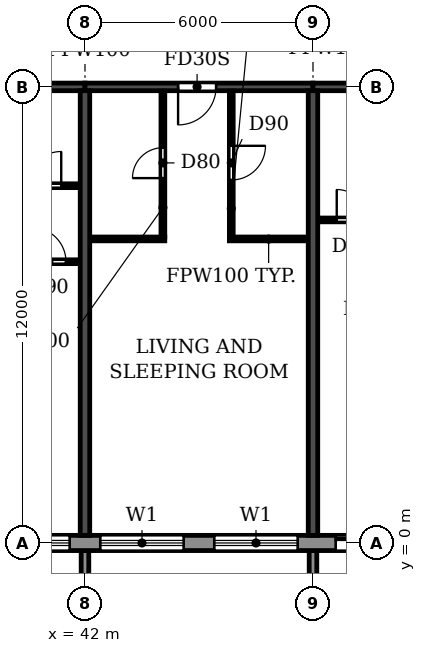
"""IFC4 building model, lengths in metres.
Left out: names, types, materials, properties, quantities, classifications, styles, units other than length and angle.
Written with IfcOpenShell. Run it as: python <this file> out.ifc"""

import sys

from ifc_helpers import new_model, si_unit, direction, frame, frame_2d, origin, place, context, subcontext, project, spatial, polyline, rectangle, outline, extrude, source, transform, mapped, element, fill, save


model = new_model("IFC4")
c1 = context("Model", 3, precision=1e-05, world=origin(), true_north=direction((0.0, 1.0)))
c2 = subcontext(c1, "Body", "Model", "MODEL_VIEW")
j1 = project(units=[si_unit("LENGTHUNIT", "METRE"), si_unit("PLANEANGLEUNIT", "RADIAN")], contexts=[c1])
p1 = place(None, origin())
s1 = spatial("IfcSite", under=j1, at=p1, CompositionType="ELEMENT")
p2 = place(p1, origin())
s2 = spatial("IfcBuilding", under=s1, at=p2, CompositionType="ELEMENT")
p3 = place(p2, frame((0.0, 0.0, 208.2)))
s3 = spatial("IfcBuildingStorey", under=s2, at=p3, CompositionType="ELEMENT", Elevation=208.2)
for number, where, z_axis, x_axis in (
    (1, (42.0, 0.2, 0.0), (0.0, 0.0, 1.0), (0.0, 1.0, 0.0)),
    (2, (48.0, 0.2, 0.0), (0.0, 0.0, 1.0), (0.0, 1.0, 0.0)),
):
    element("IfcWall", number, at=place(p3, frame(where, z_axis=z_axis, x_axis=x_axis)), inside=s3, PredefinedType="SHEAR", context=c2, shape_type="SweptSolid", body=[
        extrude(rectangle(XDim=11.7, YDim=0.25, at=frame_2d((5.85, 0.0))), origin(), (0.0, 0.0, 1.0), 3.0),
    ])
p4 = place(p3, frame((36.0, 12.0, 0.0), z_axis=(0.0, 0.0, 1.0), x_axis=(1.0, 0.0, 0.0)))
e3 = element("IfcWall", 3, at=p4, inside=s3, PredefinedType="SHEAR", context=c2, shape_type="SweptSolid", body=[
    extrude(rectangle(XDim=6.0, YDim=0.2, at=frame_2d((3.0, 0.0))), origin(), (0.0, 0.0, 1.0), 2.4),
])
p5 = place(p4, frame((2.45, 0.0, 0.0)))
e4 = element("IfcOpeningElement", 4, at=p5, cuts=e3, PredefinedType="OPENING", context=c2, shape_type="SweptSolid", body=[
    extrude(rectangle(XDim=1.0, YDim=2.1, at=frame_2d((0.5, 1.05))), frame((0.0, 0.11, 0.0), z_axis=(0.0, -1.0, 0.0), x_axis=(1.0, 0.0, 0.0)), (0.0, 0.0, 1.0), 0.22),
])
p6 = place(p3, frame((42.0, 12.0, 0.0), z_axis=(0.0, 0.0, 1.0), x_axis=(1.0, 0.0, 0.0)))
e5 = element("IfcWall", 5, at=p6, inside=s3, PredefinedType="SHEAR", context=c2, shape_type="SweptSolid", body=[
    extrude(rectangle(XDim=6.0, YDim=0.2, at=frame_2d((3.0, 0.0))), origin(), (0.0, 0.0, 1.0), 2.4),
])
p7 = place(p6, frame((2.45, 0.0, 0.0)))
e6 = element("IfcOpeningElement", 6, at=p7, cuts=e5, PredefinedType="OPENING", context=c2, shape_type="SweptSolid", body=[
    extrude(rectangle(XDim=1.0, YDim=2.1, at=frame_2d((0.5, 1.05))), frame((0.0, 0.11, 0.0), z_axis=(0.0, -1.0, 0.0), x_axis=(1.0, 0.0, 0.0)), (0.0, 0.0, 1.0), 0.22),
])
p8 = place(p3, frame((48.0, 12.0, 0.0), z_axis=(0.0, 0.0, 1.0), x_axis=(1.0, 0.0, 0.0)))
e7 = element("IfcWall", 7, at=p8, inside=s3, PredefinedType="SHEAR", context=c2, shape_type="SweptSolid", body=[
    extrude(rectangle(XDim=6.0, YDim=0.2, at=frame_2d((3.0, 0.0))), origin(), (0.0, 0.0, 1.0), 2.4),
])
p9 = place(p8, frame((2.45, 0.0, 0.0)))
e8 = element("IfcOpeningElement", 8, at=p9, cuts=e7, PredefinedType="OPENING", context=c2, shape_type="SweptSolid", body=[
    extrude(rectangle(XDim=1.0, YDim=2.1, at=frame_2d((0.5, 1.05))), frame((0.0, 0.11, 0.0), z_axis=(0.0, -1.0, 0.0), x_axis=(1.0, 0.0, 0.0)), (0.0, 0.0, 1.0), 0.22),
])
p10 = place(p3, frame((22.683, 0.0, 0.0), z_axis=(0.0, 0.0, 1.0), x_axis=(1.0, 0.0, 0.0)))
e9 = element("IfcWall", 9, at=p10, inside=s3, PredefinedType="STANDARD", context=c2, shape_type="SweptSolid", body=[
    extrude(rectangle(XDim=56.634, YDim=0.4, at=frame_2d((28.317, 0.0))), origin(), (0.0, 0.0, 1.0), 3.0),
])
p11 = place(p10, frame((1.917, 0.0, 0.0)))
e10 = element("IfcOpeningElement", 10, at=p11, cuts=e9, PredefinedType="OPENING", context=c2, shape_type="SweptSolid", body=[
    extrude(rectangle(XDim=1.8, YDim=2.4, at=frame_2d((0.9, 1.2))), frame((0.0, 0.21, 0.0), z_axis=(0.0, -1.0, 0.0), x_axis=(1.0, 0.0, 0.0)), (0.0, 0.0, 1.0), 0.42),
])
p12 = place(p10, frame((4.717, 0.0, 0.9)))
e11 = element("IfcOpeningElement", 11, at=p12, cuts=e9, PredefinedType="OPENING", context=c2, shape_type="SweptSolid", body=[
    extrude(rectangle(XDim=2.2, YDim=1.5, at=frame_2d((1.1, 0.75))), frame((0.0, 0.21, 0.0), z_axis=(0.0, -1.0, 0.0), x_axis=(1.0, 0.0, 0.0)), (0.0, 0.0, 1.0), 0.42),
])
p13 = place(p10, frame((7.717, 0.0, 0.9)))
e12 = element("IfcOpeningElement", 12, at=p13, cuts=e9, PredefinedType="OPENING", context=c2, shape_type="SweptSolid", body=[
    extrude(rectangle(XDim=2.2, YDim=1.5, at=frame_2d((1.1, 0.75))), frame((0.0, 0.21, 0.0), z_axis=(0.0, -1.0, 0.0), x_axis=(1.0, 0.0, 0.0)), (0.0, 0.0, 1.0), 0.42),
])
p14 = place(p10, frame((10.717, 0.0, 0.9)))
e13 = element("IfcOpeningElement", 13, at=p14, cuts=e9, PredefinedType="OPENING", context=c2, shape_type="SweptSolid", body=[
    extrude(rectangle(XDim=2.2, YDim=1.5, at=frame_2d((1.1, 0.75))), frame((0.0, 0.21, 0.0), z_axis=(0.0, -1.0, 0.0), x_axis=(1.0, 0.0, 0.0)), (0.0, 0.0, 1.0), 0.42),
])
p15 = place(p10, frame((13.917, 0.0, 0.0)))
e14 = element("IfcOpeningElement", 14, at=p15, cuts=e9, PredefinedType="OPENING", context=c2, shape_type="SweptSolid", body=[
    extrude(rectangle(XDim=1.8, YDim=2.4, at=frame_2d((0.9, 1.2))), frame((0.0, 0.21, 0.0), z_axis=(0.0, -1.0, 0.0), x_axis=(1.0, 0.0, 0.0)), (0.0, 0.0, 1.0), 0.42),
])
p16 = place(p10, frame((16.717, 0.0, 0.9)))
e15 = element("IfcOpeningElement", 15, at=p16, cuts=e9, PredefinedType="OPENING", context=c2, shape_type="SweptSolid", body=[
    extrude(rectangle(XDim=2.2, YDim=1.5, at=frame_2d((1.1, 0.75))), frame((0.0, 0.21, 0.0), z_axis=(0.0, -1.0, 0.0), x_axis=(1.0, 0.0, 0.0)), (0.0, 0.0, 1.0), 0.42),
])
p17 = place(p10, frame((19.717, 0.0, 0.9)))
e16 = element("IfcOpeningElement", 16, at=p17, cuts=e9, PredefinedType="OPENING", context=c2, shape_type="SweptSolid", body=[
    extrude(rectangle(XDim=2.2, YDim=1.5, at=frame_2d((1.1, 0.75))), frame((0.0, 0.21, 0.0), z_axis=(0.0, -1.0, 0.0), x_axis=(1.0, 0.0, 0.0)), (0.0, 0.0, 1.0), 0.42),
])
p18 = place(p10, frame((22.717, 0.0, 0.9)))
e17 = element("IfcOpeningElement", 17, at=p18, cuts=e9, PredefinedType="OPENING", context=c2, shape_type="SweptSolid", body=[
    extrude(rectangle(XDim=2.2, YDim=1.5, at=frame_2d((1.1, 0.75))), frame((0.0, 0.21, 0.0), z_axis=(0.0, -1.0, 0.0), x_axis=(1.0, 0.0, 0.0)), (0.0, 0.0, 1.0), 0.42),
])
p19 = place(p10, frame((25.917, 0.0, 0.0)))
e18 = element("IfcOpeningElement", 18, at=p19, cuts=e9, PredefinedType="OPENING", context=c2, shape_type="SweptSolid", body=[
    extrude(rectangle(XDim=1.8, YDim=2.4, at=frame_2d((0.9, 1.2))), frame((0.0, 0.21, 0.0), z_axis=(0.0, -1.0, 0.0), x_axis=(1.0, 0.0, 0.0)), (0.0, 0.0, 1.0), 0.42),
])
p20 = place(p10, frame((28.717, 0.0, 0.9)))
e19 = element("IfcOpeningElement", 19, at=p20, cuts=e9, PredefinedType="OPENING", context=c2, shape_type="SweptSolid", body=[
    extrude(rectangle(XDim=2.2, YDim=1.5, at=frame_2d((1.1, 0.75))), frame((0.0, 0.21, 0.0), z_axis=(0.0, -1.0, 0.0), x_axis=(1.0, 0.0, 0.0)), (0.0, 0.0, 1.0), 0.42),
])
p21 = place(p10, frame((31.717, 0.0, 0.9)))
e20 = element("IfcOpeningElement", 20, at=p21, cuts=e9, PredefinedType="OPENING", context=c2, shape_type="SweptSolid", body=[
    extrude(rectangle(XDim=2.2, YDim=1.5, at=frame_2d((1.1, 0.75))), frame((0.0, 0.21, 0.0), z_axis=(0.0, -1.0, 0.0), x_axis=(1.0, 0.0, 0.0)), (0.0, 0.0, 1.0), 0.42),
])
p22 = place(p10, frame((34.717, 0.0, 0.9)))
e21 = element("IfcOpeningElement", 21, at=p22, cuts=e9, PredefinedType="OPENING", context=c2, shape_type="SweptSolid", body=[
    extrude(rectangle(XDim=2.2, YDim=1.5, at=frame_2d((1.1, 0.75))), frame((0.0, 0.21, 0.0), z_axis=(0.0, -1.0, 0.0), x_axis=(1.0, 0.0, 0.0)), (0.0, 0.0, 1.0), 0.42),
])
p23 = place(p10, frame((37.717, 0.0, 0.9)))
e22 = element("IfcOpeningElement", 22, at=p23, cuts=e9, PredefinedType="OPENING", context=c2, shape_type="SweptSolid", body=[
    extrude(rectangle(XDim=2.2, YDim=1.5, at=frame_2d((1.1, 0.75))), frame((0.0, 0.21, 0.0), z_axis=(0.0, -1.0, 0.0), x_axis=(1.0, 0.0, 0.0)), (0.0, 0.0, 1.0), 0.42),
])
p24 = place(p10, frame((40.717, 0.0, 0.9)))
e23 = element("IfcOpeningElement", 23, at=p24, cuts=e9, PredefinedType="OPENING", context=c2, shape_type="SweptSolid", body=[
    extrude(rectangle(XDim=2.2, YDim=1.5, at=frame_2d((1.1, 0.75))), frame((0.0, 0.21, 0.0), z_axis=(0.0, -1.0, 0.0), x_axis=(1.0, 0.0, 0.0)), (0.0, 0.0, 1.0), 0.42),
])
p25 = place(p10, frame((43.717, 0.0, 0.9)))
e24 = element("IfcOpeningElement", 24, at=p25, cuts=e9, PredefinedType="OPENING", context=c2, shape_type="SweptSolid", body=[
    extrude(rectangle(XDim=2.2, YDim=1.5, at=frame_2d((1.1, 0.75))), frame((0.0, 0.21, 0.0), z_axis=(0.0, -1.0, 0.0), x_axis=(1.0, 0.0, 0.0)), (0.0, 0.0, 1.0), 0.42),
])
p26 = place(p10, frame((46.717, 0.0, 0.9)))
e25 = element("IfcOpeningElement", 25, at=p26, cuts=e9, PredefinedType="OPENING", context=c2, shape_type="SweptSolid", body=[
    extrude(rectangle(XDim=2.2, YDim=1.5, at=frame_2d((1.1, 0.75))), frame((0.0, 0.21, 0.0), z_axis=(0.0, -1.0, 0.0), x_axis=(1.0, 0.0, 0.0)), (0.0, 0.0, 1.0), 0.42),
])
p27 = place(p10, frame((49.717, 0.0, 0.9)))
e26 = element("IfcOpeningElement", 26, at=p27, cuts=e9, PredefinedType="OPENING", context=c2, shape_type="SweptSolid", body=[
    extrude(rectangle(XDim=2.2, YDim=1.5, at=frame_2d((1.1, 0.75))), frame((0.0, 0.21, 0.0), z_axis=(0.0, -1.0, 0.0), x_axis=(1.0, 0.0, 0.0)), (0.0, 0.0, 1.0), 0.42),
])
p28 = place(p10, frame((52.917, 0.0, 0.0)))
e27 = element("IfcOpeningElement", 27, at=p28, cuts=e9, PredefinedType="OPENING", context=c2, shape_type="SweptSolid", body=[
    extrude(rectangle(XDim=1.8, YDim=2.4, at=frame_2d((0.9, 1.2))), frame((0.0, 0.21, 0.0), z_axis=(0.0, -1.0, 0.0), x_axis=(1.0, 0.0, 0.0)), (0.0, 0.0, 1.0), 0.42),
])
m1 = source(origin(), c2, "Body", "SweptSolid", [
    extrude(outline(polyline([(0.0, 0.0), (0.2, 0.0), (0.2, 1.65), (0.0, 1.65), (0.0, 0.0)])), origin(), (0.0, 0.0, 1.0), 3.1),
])
for number, where in (
    (28, (41.9, -1.85, 0.0)),
    (29, (47.9, -1.85, 0.0)),
):
    element("IfcWall", number, at=place(p3, frame(where)), inside=s3, PredefinedType="STANDARD", context=c2, shape_type="MappedRepresentation", body=[
        mapped(m1, transform((0.0, 0.0, 0.0))),
    ])
p29 = place(p3, frame((38.95, 7.4, 0.0), z_axis=(0.0, 0.0, 1.0), x_axis=(1.0, 0.0, 0.0)))
e30 = element("IfcWall", 30, at=p29, inside=s3, PredefinedType="PARTITIONING", context=c2, shape_type="SweptSolid", body=[
    extrude(rectangle(XDim=2.915, YDim=0.1, at=frame_2d((1.458, 0.0))), origin(), (0.0, 0.0, 1.0), 3.0),
])
p30 = place(p29, frame((1.65, 0.0, 0.0)))
e31 = element("IfcOpeningElement", 31, at=p30, cuts=e30, PredefinedType="OPENING", context=c2, shape_type="SweptSolid", body=[
    extrude(rectangle(XDim=0.9, YDim=2.1, at=frame_2d((0.45, 1.05))), frame((0.0, 0.06, 0.0), z_axis=(0.0, -1.0, 0.0), x_axis=(1.0, 0.0, 0.0)), (0.0, 0.0, 1.0), 0.12),
])
p31 = place(p3, frame((42.135, 8.0, 0.0), z_axis=(0.0, 0.0, 1.0), x_axis=(1.0, 0.0, 0.0)))
e32 = element("IfcWall", 32, at=p31, inside=s3, PredefinedType="PARTITIONING", context=c2, shape_type="SweptSolid", body=[
    extrude(rectangle(XDim=1.965, YDim=0.1, at=frame_2d((0.982, 0.0))), origin(), (0.0, 0.0, 1.0), 3.0),
])
p32 = place(p3, frame((45.8, 8.0, 0.0), z_axis=(0.0, 0.0, 1.0), x_axis=(1.0, 0.0, 0.0)))
e33 = element("IfcWall", 33, at=p32, inside=s3, PredefinedType="PARTITIONING", context=c2, shape_type="SweptSolid", body=[
    extrude(rectangle(XDim=2.065, YDim=0.1, at=frame_2d((1.032, 0.0))), origin(), (0.0, 0.0, 1.0), 3.0),
])
p33 = place(p3, frame((48.135, 8.5, 0.0), z_axis=(0.0, 0.0, 1.0), x_axis=(1.0, 0.0, 0.0)))
e34 = element("IfcWall", 34, at=p33, inside=s3, PredefinedType="PARTITIONING", context=c2, shape_type="SweptSolid", body=[
    extrude(rectangle(XDim=1.965, YDim=0.1, at=frame_2d((0.982, 0.0))), origin(), (0.0, 0.0, 1.0), 3.0),
])
p34 = place(p33, frame((0.49, 0.0, 0.0)))
e35 = element("IfcOpeningElement", 35, at=p34, cuts=e34, PredefinedType="OPENING", context=c2, shape_type="SweptSolid", body=[
    extrude(rectangle(XDim=0.8, YDim=2.1, at=frame_2d((0.4, 1.05))), frame((0.0, 0.06, 0.0), z_axis=(0.0, -1.0, 0.0), x_axis=(1.0, 0.0, 0.0)), (0.0, 0.0, 1.0), 0.12),
])
p35 = place(p3, frame((39.8, 9.4, 0.0), z_axis=(0.0, 0.0, 1.0), x_axis=(1.0, 0.0, 0.0)))
e36 = element("IfcWall", 36, at=p35, inside=s3, PredefinedType="PARTITIONING", context=c2, shape_type="SweptSolid", body=[
    extrude(rectangle(XDim=2.065, YDim=0.1, at=frame_2d((1.032, 0.0))), origin(), (0.0, 0.0, 1.0), 3.0),
])
p36 = place(p35, frame((0.675, 0.0, 0.0)))
e37 = element("IfcOpeningElement", 37, at=p36, cuts=e36, PredefinedType="OPENING", context=c2, shape_type="SweptSolid", body=[
    extrude(rectangle(XDim=0.9, YDim=2.1, at=frame_2d((0.45, 1.05))), frame((0.0, 0.06, 0.0), z_axis=(0.0, -1.0, 0.0), x_axis=(1.0, 0.0, 0.0)), (0.0, 0.0, 1.0), 0.12),
])
p37 = place(p3, frame((44.05, 8.05, 0.0), z_axis=(0.0, 0.0, 1.0), x_axis=(0.0, 1.0, 0.0)))
e38 = element("IfcWall", 38, at=p37, inside=s3, PredefinedType="PARTITIONING", context=c2, shape_type="SweptSolid", body=[
    extrude(rectangle(XDim=3.84, YDim=0.1, at=frame_2d((1.92, 0.0))), origin(), (0.0, 0.0, 1.0), 3.0),
])
p38 = place(p37, frame((1.55, 0.0, 0.0)))
e39 = element("IfcOpeningElement", 39, at=p38, cuts=e38, PredefinedType="OPENING", context=c2, shape_type="SweptSolid", body=[
    extrude(rectangle(XDim=0.8, YDim=2.1, at=frame_2d((0.4, 1.05))), frame((0.0, 0.06, 0.0), z_axis=(0.0, -1.0, 0.0), x_axis=(1.0, 0.0, 0.0)), (0.0, 0.0, 1.0), 0.12),
])
p39 = place(p3, frame((45.85, 8.05, 0.0), z_axis=(0.0, 0.0, 1.0), x_axis=(0.0, 1.0, 0.0)))
e40 = element("IfcWall", 40, at=p39, inside=s3, PredefinedType="PARTITIONING", context=c2, shape_type="SweptSolid", body=[
    extrude(rectangle(XDim=3.84, YDim=0.1, at=frame_2d((1.92, 0.0))), origin(), (0.0, 0.0, 1.0), 3.0),
])
p40 = place(p39, frame((1.5, 0.0, 0.0)))
e41 = element("IfcOpeningElement", 41, at=p40, cuts=e40, PredefinedType="OPENING", context=c2, shape_type="SweptSolid", body=[
    extrude(rectangle(XDim=0.9, YDim=2.1, at=frame_2d((0.45, 1.05))), frame((0.0, 0.06, 0.0), z_axis=(0.0, -1.0, 0.0), x_axis=(1.0, 0.0, 0.0)), (0.0, 0.0, 1.0), 0.12),
])
p41 = place(p16, origin())
e42 = element("IfcWindow", 42, at=p41, inside=s3, PartitioningType="DOUBLE_PANEL_HORIZONTAL", PredefinedType="WINDOW", context=c2, shape_type="SweptSolid", body=[
    extrude(rectangle(XDim=2.2, YDim=1.5, at=frame_2d((1.1, 0.75))), frame((0.0, 0.03, 0.0), z_axis=(0.0, -1.0, 0.0), x_axis=(1.0, 0.0, 0.0)), (0.0, 0.0, 1.0), 0.06),
])
fill(e15, e42)
p42 = place(p17, origin())
e43 = element("IfcWindow", 43, at=p42, inside=s3, PartitioningType="DOUBLE_PANEL_HORIZONTAL", PredefinedType="WINDOW", context=c2, shape_type="SweptSolid", body=[
    extrude(rectangle(XDim=2.2, YDim=1.5, at=frame_2d((1.1, 0.75))), frame((0.0, 0.03, 0.0), z_axis=(0.0, -1.0, 0.0), x_axis=(1.0, 0.0, 0.0)), (0.0, 0.0, 1.0), 0.06),
])
fill(e16, e43)
p43 = place(p18, origin())
e44 = element("IfcWindow", 44, at=p43, inside=s3, PartitioningType="DOUBLE_PANEL_HORIZONTAL", PredefinedType="WINDOW", context=c2, shape_type="SweptSolid", body=[
    extrude(rectangle(XDim=2.2, YDim=1.5, at=frame_2d((1.1, 0.75))), frame((0.0, 0.03, 0.0), z_axis=(0.0, -1.0, 0.0), x_axis=(1.0, 0.0, 0.0)), (0.0, 0.0, 1.0), 0.06),
])
fill(e17, e44)
p44 = place(p19, origin())
e45 = element("IfcDoor", 45, at=p44, inside=s3, OperationType="DOUBLE_DOOR_SLIDING", PredefinedType="DOOR", context=c2, shape_type="SweptSolid", body=[
    extrude(rectangle(XDim=1.8, YDim=2.4, at=frame_2d((0.9, 1.2))), frame((0.0, 0.025, 0.0), z_axis=(0.0, -1.0, 0.0), x_axis=(1.0, 0.0, 0.0)), (0.0, 0.0, 1.0), 0.05),
])
fill(e18, e45)
p45 = place(p36, origin())
e46 = element("IfcDoor", 46, at=p45, inside=s3, OperationType="SINGLE_SWING_RIGHT", PredefinedType="DOOR", context=c2, shape_type="SweptSolid", body=[
    extrude(rectangle(XDim=0.9, YDim=2.1, at=frame_2d((0.45, 1.05))), frame((0.0, 0.025, 0.0), z_axis=(0.0, -1.0, 0.0), x_axis=(1.0, 0.0, 0.0)), (0.0, 0.0, 1.0), 0.05),
])
fill(e37, e46)
p46 = place(p30, origin())
e47 = element("IfcDoor", 47, at=p46, inside=s3, OperationType="SINGLE_SWING_LEFT", PredefinedType="DOOR", context=c2, shape_type="SweptSolid", body=[
    extrude(rectangle(XDim=0.9, YDim=2.1, at=frame_2d((0.45, 1.05))), frame((0.0, 0.025, 0.0), z_axis=(0.0, -1.0, 0.0), x_axis=(1.0, 0.0, 0.0)), (0.0, 0.0, 1.0), 0.05),
])
fill(e31, e47)
p47 = place(p38, origin())
e48 = element("IfcDoor", 48, at=p47, inside=s3, OperationType="SINGLE_SWING_LEFT", PredefinedType="DOOR", context=c2, shape_type="SweptSolid", body=[
    extrude(rectangle(XDim=0.8, YDim=2.1, at=frame_2d((0.4, 1.05))), frame((0.0, 0.025, 0.0), z_axis=(0.0, -1.0, 0.0), x_axis=(1.0, 0.0, 0.0)), (0.0, 0.0, 1.0), 0.05),
])
fill(e39, e48)
p48 = place(p7, frame((1.0, 0.0, 0.0), z_axis=(0.0, 0.0, 1.0), x_axis=(-1.0, 0.0, 0.0)))
e49 = element("IfcDoor", 49, at=p48, inside=s3, OperationType="SINGLE_SWING_RIGHT", PredefinedType="DOOR", context=c2, shape_type="SweptSolid", body=[
    extrude(rectangle(XDim=1.0, YDim=2.1, at=frame_2d((0.5, 1.05))), frame((0.0, 0.025, 0.0), z_axis=(0.0, -1.0, 0.0), x_axis=(1.0, 0.0, 0.0)), (0.0, 0.0, 1.0), 0.05),
])
fill(e6, e49)
p49 = place(p40, frame((0.9, 0.0, 0.0), z_axis=(0.0, 0.0, 1.0), x_axis=(-1.0, 0.0, 0.0)))
e50 = element("IfcDoor", 50, at=p49, inside=s3, OperationType="SINGLE_SWING_LEFT", PredefinedType="DOOR", context=c2, shape_type="SweptSolid", body=[
    extrude(rectangle(XDim=0.9, YDim=2.1, at=frame_2d((0.45, 1.05))), frame((0.0, 0.025, 0.0), z_axis=(0.0, -1.0, 0.0), x_axis=(1.0, 0.0, 0.0)), (0.0, 0.0, 1.0), 0.05),
])
fill(e41, e50)
p50 = place(p34, origin())
e51 = element("IfcDoor", 51, at=p50, inside=s3, OperationType="SINGLE_SWING_LEFT", PredefinedType="DOOR", context=c2, shape_type="SweptSolid", body=[
    extrude(rectangle(XDim=0.8, YDim=2.1, at=frame_2d((0.4, 1.05))), frame((0.0, 0.025, 0.0), z_axis=(0.0, -1.0, 0.0), x_axis=(1.0, 0.0, 0.0)), (0.0, 0.0, 1.0), 0.05),
])
fill(e35, e51)
save(model, sys.argv[1])
